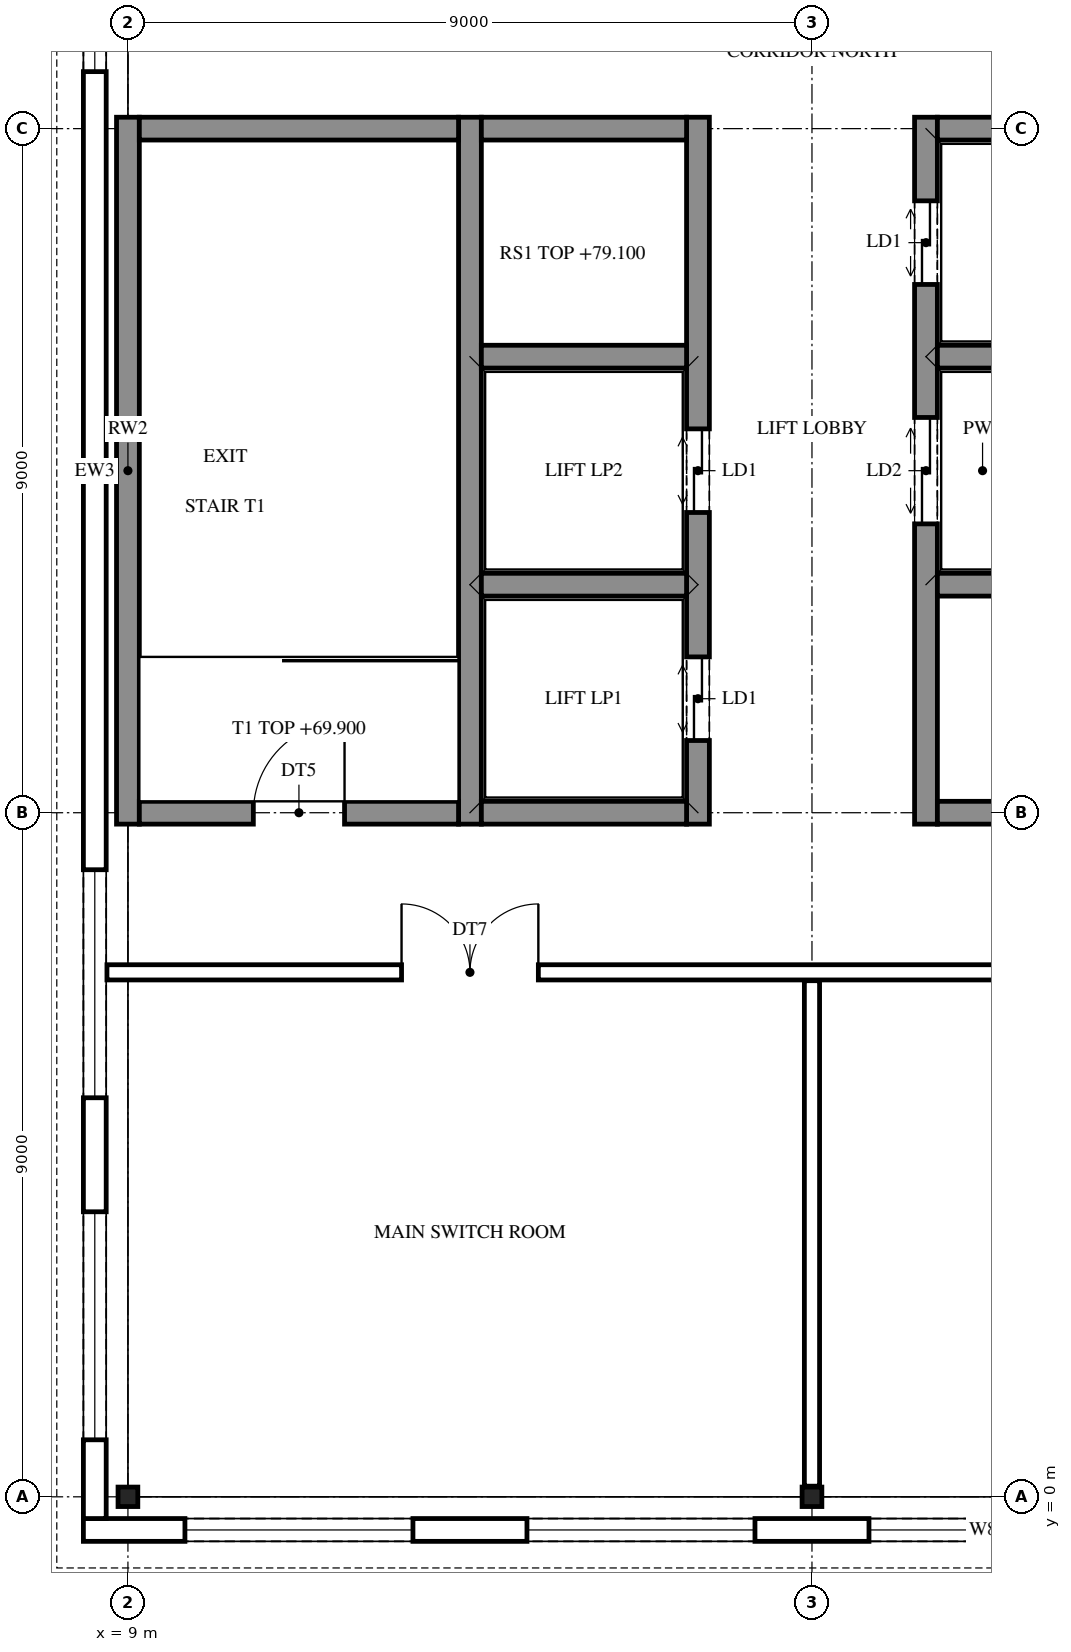
"""IFC4 building model, lengths in metres.
Left out: names, types, materials, properties, quantities, classifications, styles, units other than length and angle.
Written with IfcOpenShell. Run it as: python <this file> out.ifc"""

import sys

from ifc_helpers import new_model, si_unit, direction, frame, frame_2d, origin, origin_2d, place, context, subcontext, project, spatial, rectangle, i_section, extrude, element, fill, save


model = new_model("IFC4")
c1 = context("Model", 3, precision=1e-05, world=origin(), true_north=direction((0.0, 1.0)))
c2 = subcontext(c1, "Body", "Model", "MODEL_VIEW")
j1 = project(units=[si_unit("LENGTHUNIT", "METRE"), si_unit("PLANEANGLEUNIT", "RADIAN")], contexts=[c1])
p1 = place(None, origin())
s1 = spatial("IfcSite", under=j1, at=p1, CompositionType="ELEMENT")
p2 = place(p1, origin())
s2 = spatial("IfcBuilding", under=s1, at=p2, CompositionType="ELEMENT")
p3 = place(p2, frame((0.0, 0.0, 69.9)))
s3 = spatial("IfcBuildingStorey", under=s2, at=p3, CompositionType="ELEMENT", Elevation=69.9)
for number, where, z_axis, x_axis in (
    (1, (9.0, 0.0, 0.0), (0.0, 0.0, 1.0), (0.0, 1.0, 0.0)),
    (2, (18.0, 0.0, 0.0), (0.0, 0.0, 1.0), (0.0, 1.0, 0.0)),
):
    element("IfcColumn", number, at=place(p3, frame(where, z_axis=z_axis, x_axis=x_axis)), inside=s3, PredefinedType="COLUMN", context=c2, shape_type="SweptSolid", body=[
        extrude(i_section(OverallWidth=0.256, OverallDepth=0.26, WebThickness=0.01, FlangeThickness=0.017, FilletRadius=0.014, at=origin_2d()), origin(), (0.0, 0.0, 1.0), 4.5),
    ])
for number, where, z_axis, x_axis in (
    (3, (9.0, 8.85, 0.0), (0.0, 0.0, 1.0), (0.0, 1.0, 0.0)),
    (4, (13.5, 8.85, 0.0), (0.0, 0.0, 1.0), (0.0, 1.0, 0.0)),
):
    element("IfcWall", number, at=place(p3, frame(where, z_axis=z_axis, x_axis=x_axis)), inside=s3, PredefinedType="SHEAR", context=c2, shape_type="SweptSolid", body=[
        extrude(rectangle(XDim=9.3, YDim=0.3, at=frame_2d((4.65, 0.0))), origin(), (0.0, 0.0, 1.0), 4.5),
    ])
p4 = place(p3, frame((16.5, 8.85, 0.0), z_axis=(0.0, 0.0, 1.0), x_axis=(0.0, 1.0, 0.0)))
e5 = element("IfcWall", 5, at=p4, inside=s3, PredefinedType="SHEAR", context=c2, shape_type="SweptSolid", body=[
    extrude(rectangle(XDim=9.3, YDim=0.3, at=frame_2d((4.65, 0.0))), origin(), (0.0, 0.0, 1.0), 4.5),
])
p5 = place(p4, frame((1.1, 0.0, 0.0)))
e6 = element("IfcOpeningElement", 6, at=p5, cuts=e5, PredefinedType="OPENING", context=c2, shape_type="SweptSolid", body=[
    extrude(rectangle(XDim=1.1, YDim=2.1, at=frame_2d((0.55, 1.05))), frame((0.0, 0.16, 0.0), z_axis=(0.0, -1.0, 0.0), x_axis=(1.0, 0.0, 0.0)), (0.0, 0.0, 1.0), 0.32),
])
p6 = place(p4, frame((4.1, 0.0, 0.0)))
e7 = element("IfcOpeningElement", 7, at=p6, cuts=e5, PredefinedType="OPENING", context=c2, shape_type="SweptSolid", body=[
    extrude(rectangle(XDim=1.1, YDim=2.1, at=frame_2d((0.55, 1.05))), frame((0.0, 0.16, 0.0), z_axis=(0.0, -1.0, 0.0), x_axis=(1.0, 0.0, 0.0)), (0.0, 0.0, 1.0), 0.32),
])
p7 = place(p3, frame((19.5, 8.85, 0.0), z_axis=(0.0, 0.0, 1.0), x_axis=(0.0, 1.0, 0.0)))
e8 = element("IfcWall", 8, at=p7, inside=s3, PredefinedType="SHEAR", context=c2, shape_type="SweptSolid", body=[
    extrude(rectangle(XDim=9.3, YDim=0.3, at=frame_2d((4.65, 0.0))), origin(), (0.0, 0.0, 1.0), 4.5),
])
p8 = place(p7, frame((3.95, 0.0, 0.0)))
e9 = element("IfcOpeningElement", 9, at=p8, cuts=e8, PredefinedType="OPENING", context=c2, shape_type="SweptSolid", body=[
    extrude(rectangle(XDim=1.4, YDim=2.1, at=frame_2d((0.7, 1.05))), frame((0.0, 0.16, 0.0), z_axis=(0.0, -1.0, 0.0), x_axis=(1.0, 0.0, 0.0)), (0.0, 0.0, 1.0), 0.32),
])
p9 = place(p7, frame((7.1, 0.0, 0.0)))
e10 = element("IfcOpeningElement", 10, at=p9, cuts=e8, PredefinedType="OPENING", context=c2, shape_type="SweptSolid", body=[
    extrude(rectangle(XDim=1.1, YDim=2.1, at=frame_2d((0.55, 1.05))), frame((0.0, 0.16, 0.0), z_axis=(0.0, -1.0, 0.0), x_axis=(1.0, 0.0, 0.0)), (0.0, 0.0, 1.0), 0.32),
])
p10 = place(p3, frame((9.15, 9.0, 0.0), z_axis=(0.0, 0.0, 1.0), x_axis=(1.0, 0.0, 0.0)))
e11 = element("IfcWall", 11, at=p10, inside=s3, PredefinedType="SHEAR", context=c2, shape_type="SweptSolid", body=[
    extrude(rectangle(XDim=4.2, YDim=0.3, at=frame_2d((2.1, 0.0))), origin(), (0.0, 0.0, 1.0), 4.5),
])
p11 = place(p10, frame((1.5, 0.0, 0.0)))
e12 = element("IfcOpeningElement", 12, at=p11, cuts=e11, PredefinedType="OPENING", context=c2, shape_type="SweptSolid", body=[
    extrude(rectangle(XDim=1.2, YDim=2.1, at=frame_2d((0.6, 1.05))), frame((0.0, 0.16, 0.0), z_axis=(0.0, -1.0, 0.0), x_axis=(1.0, 0.0, 0.0)), (0.0, 0.0, 1.0), 0.32),
])
for number, where, z_axis, x_axis in (
    (13, (13.65, 9.0, 0.0), (0.0, 0.0, 1.0), (1.0, 0.0, 0.0)),
    (14, (19.65, 9.0, 0.0), (0.0, 0.0, 1.0), (1.0, 0.0, 0.0)),
    (15, (13.65, 12.0, 0.0), (0.0, 0.0, 1.0), (1.0, 0.0, 0.0)),
    (16, (19.65, 12.0, 0.0), (0.0, 0.0, 1.0), (1.0, 0.0, 0.0)),
    (17, (13.65, 15.0, 0.0), (0.0, 0.0, 1.0), (1.0, 0.0, 0.0)),
    (18, (19.65, 15.0, 0.0), (0.0, 0.0, 1.0), (1.0, 0.0, 0.0)),
):
    element("IfcWall", number, at=place(p3, frame(where, z_axis=z_axis, x_axis=x_axis)), inside=s3, PredefinedType="SHEAR", context=c2, shape_type="SweptSolid", body=[
        extrude(rectangle(XDim=2.7, YDim=0.3, at=frame_2d((1.35, 0.0))), origin(), (0.0, 0.0, 1.0), 4.5),
    ])
p12 = place(p3, frame((9.15, 18.0, 0.0), z_axis=(0.0, 0.0, 1.0), x_axis=(1.0, 0.0, 0.0)))
e19 = element("IfcWall", 19, at=p12, inside=s3, PredefinedType="SHEAR", context=c2, shape_type="SweptSolid", body=[
    extrude(rectangle(XDim=4.2, YDim=0.3, at=frame_2d((2.1, 0.0))), origin(), (0.0, 0.0, 1.0), 4.5),
])
for number, where, z_axis, x_axis in (
    (20, (13.65, 18.0, 0.0), (0.0, 0.0, 1.0), (1.0, 0.0, 0.0)),
    (21, (19.65, 18.0, 0.0), (0.0, 0.0, 1.0), (1.0, 0.0, 0.0)),
):
    element("IfcWall", number, at=place(p3, frame(where, z_axis=z_axis, x_axis=x_axis)), inside=s3, PredefinedType="SHEAR", context=c2, shape_type="SweptSolid", body=[
        extrude(rectangle(XDim=2.7, YDim=0.3, at=frame_2d((1.35, 0.0))), origin(), (0.0, 0.0, 1.0), 4.5),
    ])
p13 = place(p3, frame((32.075, -0.436, 0.0), z_axis=(0.0, 0.0, 1.0), x_axis=(-1.0, 0.0, 0.0)))
e22 = element("IfcWall", 22, at=p13, inside=s3, PredefinedType="STANDARD", context=c2, shape_type="SweptSolid", body=[
    extrude(rectangle(XDim=23.661, YDim=0.3, at=frame_2d((11.831, 0.0))), origin(), (0.0, 0.0, 1.0), 4.5),
])
p14 = place(p13, frame((19.325, 0.0, 0.6)))
e23 = element("IfcOpeningElement", 23, at=p14, cuts=e22, PredefinedType="OPENING", context=c2, shape_type="SweptSolid", body=[
    extrude(rectangle(XDim=3.0, YDim=3.1, at=frame_2d((1.5, 1.55))), frame((0.0, 0.16, 0.0), z_axis=(0.0, -1.0, 0.0), x_axis=(1.0, 0.0, 0.0)), (0.0, 0.0, 1.0), 0.32),
])
p15 = place(p13, frame((14.825, 0.0, 0.6)))
e24 = element("IfcOpeningElement", 24, at=p15, cuts=e22, PredefinedType="OPENING", context=c2, shape_type="SweptSolid", body=[
    extrude(rectangle(XDim=3.0, YDim=3.1, at=frame_2d((1.5, 1.55))), frame((0.0, 0.16, 0.0), z_axis=(0.0, -1.0, 0.0), x_axis=(1.0, 0.0, 0.0)), (0.0, 0.0, 1.0), 0.32),
])
p16 = place(p13, frame((10.325, 0.0, 0.6)))
e25 = element("IfcOpeningElement", 25, at=p16, cuts=e22, PredefinedType="OPENING", context=c2, shape_type="SweptSolid", body=[
    extrude(rectangle(XDim=3.0, YDim=3.1, at=frame_2d((1.5, 1.55))), frame((0.0, 0.16, 0.0), z_axis=(0.0, -1.0, 0.0), x_axis=(1.0, 0.0, 0.0)), (0.0, 0.0, 1.0), 0.32),
])
p17 = place(p13, frame((5.825, 0.0, 0.6)))
e26 = element("IfcOpeningElement", 26, at=p17, cuts=e22, PredefinedType="OPENING", context=c2, shape_type="SweptSolid", body=[
    extrude(rectangle(XDim=3.0, YDim=3.1, at=frame_2d((1.5, 1.55))), frame((0.0, 0.16, 0.0), z_axis=(0.0, -1.0, 0.0), x_axis=(1.0, 0.0, 0.0)), (0.0, 0.0, 1.0), 0.32),
])
p18 = place(p13, frame((1.325, 0.0, 0.6)))
e27 = element("IfcOpeningElement", 27, at=p18, cuts=e22, PredefinedType="OPENING", context=c2, shape_type="SweptSolid", body=[
    extrude(rectangle(XDim=3.0, YDim=3.1, at=frame_2d((1.5, 1.55))), frame((0.0, 0.16, 0.0), z_axis=(0.0, -1.0, 0.0), x_axis=(1.0, 0.0, 0.0)), (0.0, 0.0, 1.0), 0.32),
])
p19 = place(p3, frame((8.564, -0.286, 0.0), z_axis=(0.0, 0.0, 1.0), x_axis=(0.0, 1.0, 0.0)))
e28 = element("IfcWall", 28, at=p19, inside=s3, PredefinedType="STANDARD", context=c2, shape_type="SweptSolid", body=[
    extrude(rectangle(XDim=27.572, YDim=0.3, at=frame_2d((13.786, 0.0))), origin(), (0.0, 0.0, 1.0), 4.5),
])
p20 = place(p19, frame((1.036, 0.0, 0.6)))
e29 = element("IfcOpeningElement", 29, at=p20, cuts=e28, PredefinedType="OPENING", context=c2, shape_type="SweptSolid", body=[
    extrude(rectangle(XDim=3.0, YDim=3.1, at=frame_2d((1.5, 1.55))), frame((0.0, 0.16, 0.0), z_axis=(0.0, -1.0, 0.0), x_axis=(1.0, 0.0, 0.0)), (0.0, 0.0, 1.0), 0.32),
])
p21 = place(p19, frame((5.536, 0.0, 0.6)))
e30 = element("IfcOpeningElement", 30, at=p21, cuts=e28, PredefinedType="OPENING", context=c2, shape_type="SweptSolid", body=[
    extrude(rectangle(XDim=3.0, YDim=3.1, at=frame_2d((1.5, 1.55))), frame((0.0, 0.16, 0.0), z_axis=(0.0, -1.0, 0.0), x_axis=(1.0, 0.0, 0.0)), (0.0, 0.0, 1.0), 0.32),
])
p22 = place(p19, frame((19.036, 0.0, 0.6)))
e31 = element("IfcOpeningElement", 31, at=p22, cuts=e28, PredefinedType="OPENING", context=c2, shape_type="SweptSolid", body=[
    extrude(rectangle(XDim=3.0, YDim=3.1, at=frame_2d((1.5, 1.55))), frame((0.0, 0.16, 0.0), z_axis=(0.0, -1.0, 0.0), x_axis=(1.0, 0.0, 0.0)), (0.0, 0.0, 1.0), 0.32),
])
p23 = place(p19, frame((23.536, 0.0, 0.6)))
e32 = element("IfcOpeningElement", 32, at=p23, cuts=e28, PredefinedType="OPENING", context=c2, shape_type="SweptSolid", body=[
    extrude(rectangle(XDim=3.0, YDim=3.1, at=frame_2d((1.5, 1.55))), frame((0.0, 0.16, 0.0), z_axis=(0.0, -1.0, 0.0), x_axis=(1.0, 0.0, 0.0)), (0.0, 0.0, 1.0), 0.32),
])
p24 = place(p3, frame((32.075, -0.436, 4.5), z_axis=(0.0, 0.0, 1.0), x_axis=(-1.0, 0.0, 0.0)))
e33 = element("IfcWall", 33, at=p24, inside=s3, PredefinedType="PARAPET", context=c2, shape_type="SweptSolid", body=[
    extrude(rectangle(XDim=23.661, YDim=0.3, at=frame_2d((11.831, 0.0))), origin(), (0.0, 0.0, 1.0), 1.25),
])
p25 = place(p3, frame((8.564, -0.286, 4.5), z_axis=(0.0, 0.0, 1.0), x_axis=(0.0, 1.0, 0.0)))
e34 = element("IfcWall", 34, at=p25, inside=s3, PredefinedType="PARAPET", context=c2, shape_type="SweptSolid", body=[
    extrude(rectangle(XDim=27.572, YDim=0.3, at=frame_2d((13.786, 0.0))), origin(), (0.0, 0.0, 1.0), 1.25),
])
p26 = place(p3, frame((18.0, 0.14, 0.0), z_axis=(0.0, 0.0, 1.0), x_axis=(0.0, 1.0, 0.0)))
e35 = element("IfcWall", 35, at=p26, inside=s3, PredefinedType="PARTITIONING", context=c2, shape_type="SweptSolid", body=[
    extrude(rectangle(XDim=6.65, YDim=0.2, at=frame_2d((3.325, 0.0))), origin(), (0.0, 0.0, 1.0), 3.822),
])
p27 = place(p3, frame((8.724, 6.9, 0.0), z_axis=(0.0, 0.0, 1.0), x_axis=(1.0, 0.0, 0.0)))
e36 = element("IfcWall", 36, at=p27, inside=s3, PredefinedType="PARTITIONING", context=c2, shape_type="SweptSolid", body=[
    extrude(rectangle(XDim=18.276, YDim=0.2, at=frame_2d((9.138, 0.0))), origin(), (0.0, 0.0, 1.0), 3.822),
])
p28 = place(p27, frame((3.876, 0.0, 0.0)))
e37 = element("IfcOpeningElement", 37, at=p28, cuts=e36, PredefinedType="OPENING", context=c2, shape_type="SweptSolid", body=[
    extrude(rectangle(XDim=1.8, YDim=2.1, at=frame_2d((0.9, 1.05))), frame((0.0, 0.11, 0.0), z_axis=(0.0, -1.0, 0.0), x_axis=(1.0, 0.0, 0.0)), (0.0, 0.0, 1.0), 0.22),
])
p29 = place(p27, frame((14.076, 0.0, 0.0)))
e38 = element("IfcOpeningElement", 38, at=p29, cuts=e36, PredefinedType="OPENING", context=c2, shape_type="SweptSolid", body=[
    extrude(rectangle(XDim=1.8, YDim=2.1, at=frame_2d((0.9, 1.05))), frame((0.0, 0.11, 0.0), z_axis=(0.0, -1.0, 0.0), x_axis=(1.0, 0.0, 0.0)), (0.0, 0.0, 1.0), 0.22),
])
for number, where, z_axis, x_axis in (
    (39, (13.5, 8.85, 4.5), (0.0, 0.0, 1.0), (0.0, 1.0, 0.0)),
    (40, (16.5, 8.85, 4.5), (0.0, 0.0, 1.0), (0.0, 1.0, 0.0)),
):
    element("IfcWall", number, at=place(p3, frame(where, z_axis=z_axis, x_axis=x_axis)), inside=s3, PredefinedType="SOLIDWALL", context=c2, shape_type="SweptSolid", body=[
        extrude(rectangle(XDim=9.3, YDim=0.3, at=frame_2d((4.65, 0.0))), origin(), (0.0, 0.0, 1.0), 4.5),
    ])
for number, where, z_axis, x_axis in (
    (41, (13.65, 9.0, 4.5), (0.0, 0.0, 1.0), (1.0, 0.0, 0.0)),
    (42, (13.65, 12.0, 4.5), (0.0, 0.0, 1.0), (1.0, 0.0, 0.0)),
    (43, (13.65, 15.0, 4.5), (0.0, 0.0, 1.0), (1.0, 0.0, 0.0)),
    (44, (13.65, 18.0, 4.5), (0.0, 0.0, 1.0), (1.0, 0.0, 0.0)),
):
    element("IfcWall", number, at=place(p3, frame(where, z_axis=z_axis, x_axis=x_axis)), inside=s3, PredefinedType="SOLIDWALL", context=c2, shape_type="SweptSolid", body=[
        extrude(rectangle(XDim=2.7, YDim=0.3, at=frame_2d((1.35, 0.0))), origin(), (0.0, 0.0, 1.0), 4.5),
    ])
p30 = place(p3, frame((19.5, 8.85, 4.5), z_axis=(0.0, 0.0, 1.0), x_axis=(0.0, 1.0, 0.0)))
e45 = element("IfcWall", 45, at=p30, inside=s3, PredefinedType="SOLIDWALL", context=c2, shape_type="SweptSolid", body=[
    extrude(rectangle(XDim=9.3, YDim=0.3, at=frame_2d((4.65, 0.0))), origin(), (0.0, 0.0, 1.0), 4.5),
])
for number, where, z_axis, x_axis in (
    (46, (19.65, 9.0, 4.5), (0.0, 0.0, 1.0), (1.0, 0.0, 0.0)),
    (47, (19.65, 12.0, 4.5), (0.0, 0.0, 1.0), (1.0, 0.0, 0.0)),
    (48, (19.65, 15.0, 4.5), (0.0, 0.0, 1.0), (1.0, 0.0, 0.0)),
    (49, (19.65, 18.0, 4.5), (0.0, 0.0, 1.0), (1.0, 0.0, 0.0)),
):
    element("IfcWall", number, at=place(p3, frame(where, z_axis=z_axis, x_axis=x_axis)), inside=s3, PredefinedType="SOLIDWALL", context=c2, shape_type="SweptSolid", body=[
        extrude(rectangle(XDim=2.7, YDim=0.3, at=frame_2d((1.35, 0.0))), origin(), (0.0, 0.0, 1.0), 4.5),
    ])
p31 = place(p14, origin())
e50 = element("IfcWindow", 50, at=p31, inside=s3, PartitioningType="SINGLE_PANEL", PredefinedType="WINDOW", context=c2, shape_type="SweptSolid", body=[
    extrude(rectangle(XDim=3.0, YDim=3.1, at=frame_2d((1.5, 1.55))), frame((0.0, 0.03, 0.0), z_axis=(0.0, -1.0, 0.0), x_axis=(1.0, 0.0, 0.0)), (0.0, 0.0, 1.0), 0.06),
])
fill(e23, e50)
p32 = place(p15, origin())
e51 = element("IfcWindow", 51, at=p32, inside=s3, PartitioningType="SINGLE_PANEL", PredefinedType="WINDOW", context=c2, shape_type="SweptSolid", body=[
    extrude(rectangle(XDim=3.0, YDim=3.1, at=frame_2d((1.5, 1.55))), frame((0.0, 0.03, 0.0), z_axis=(0.0, -1.0, 0.0), x_axis=(1.0, 0.0, 0.0)), (0.0, 0.0, 1.0), 0.06),
])
fill(e24, e51)
p33 = place(p16, origin())
e52 = element("IfcWindow", 52, at=p33, inside=s3, PartitioningType="SINGLE_PANEL", PredefinedType="WINDOW", context=c2, shape_type="SweptSolid", body=[
    extrude(rectangle(XDim=3.0, YDim=3.1, at=frame_2d((1.5, 1.55))), frame((0.0, 0.03, 0.0), z_axis=(0.0, -1.0, 0.0), x_axis=(1.0, 0.0, 0.0)), (0.0, 0.0, 1.0), 0.06),
])
fill(e25, e52)
p34 = place(p20, origin())
e53 = element("IfcWindow", 53, at=p34, inside=s3, PartitioningType="SINGLE_PANEL", PredefinedType="WINDOW", context=c2, shape_type="SweptSolid", body=[
    extrude(rectangle(XDim=3.0, YDim=3.1, at=frame_2d((1.5, 1.55))), frame((0.0, 0.03, 0.0), z_axis=(0.0, -1.0, 0.0), x_axis=(1.0, 0.0, 0.0)), (0.0, 0.0, 1.0), 0.06),
])
fill(e29, e53)
p35 = place(p21, origin())
e54 = element("IfcWindow", 54, at=p35, inside=s3, PartitioningType="SINGLE_PANEL", PredefinedType="WINDOW", context=c2, shape_type="SweptSolid", body=[
    extrude(rectangle(XDim=3.0, YDim=3.1, at=frame_2d((1.5, 1.55))), frame((0.0, 0.03, 0.0), z_axis=(0.0, -1.0, 0.0), x_axis=(1.0, 0.0, 0.0)), (0.0, 0.0, 1.0), 0.06),
])
fill(e30, e54)
p36 = place(p22, origin())
e55 = element("IfcWindow", 55, at=p36, inside=s3, PartitioningType="SINGLE_PANEL", PredefinedType="WINDOW", context=c2, shape_type="SweptSolid", body=[
    extrude(rectangle(XDim=3.0, YDim=3.1, at=frame_2d((1.5, 1.55))), frame((0.0, 0.03, 0.0), z_axis=(0.0, -1.0, 0.0), x_axis=(1.0, 0.0, 0.0)), (0.0, 0.0, 1.0), 0.06),
])
fill(e31, e55)
p37 = place(p11, origin())
e56 = element("IfcDoor", 56, at=p37, inside=s3, OperationType="SINGLE_SWING_RIGHT", PredefinedType="DOOR", context=c2, shape_type="SweptSolid", body=[
    extrude(rectangle(XDim=1.2, YDim=2.1, at=frame_2d((0.6, 1.05))), frame((0.0, 0.025, 0.0), z_axis=(0.0, -1.0, 0.0), x_axis=(1.0, 0.0, 0.0)), (0.0, 0.0, 1.0), 0.05),
])
fill(e12, e56)
p38 = place(p28, frame((1.8, 0.0, 0.0), z_axis=(0.0, 0.0, 1.0), x_axis=(-1.0, 0.0, 0.0)))
e57 = element("IfcDoor", 57, at=p38, inside=s3, OperationType="DOUBLE_DOOR_SINGLE_SWING", PredefinedType="DOOR", context=c2, shape_type="SweptSolid", body=[
    extrude(rectangle(XDim=1.8, YDim=2.1, at=frame_2d((0.9, 1.05))), frame((0.0, 0.025, 0.0), z_axis=(0.0, -1.0, 0.0), x_axis=(1.0, 0.0, 0.0)), (0.0, 0.0, 1.0), 0.05),
])
fill(e37, e57)
p39 = place(p5, origin())
e58 = element("IfcDoor", 58, at=p39, inside=s3, OperationType="DOUBLE_DOOR_SLIDING", PredefinedType="DOOR", context=c2, shape_type="SweptSolid", body=[
    extrude(rectangle(XDim=1.1, YDim=2.1, at=frame_2d((0.55, 1.05))), frame((0.0, 0.025, 0.0), z_axis=(0.0, -1.0, 0.0), x_axis=(1.0, 0.0, 0.0)), (0.0, 0.0, 1.0), 0.05),
])
fill(e6, e58)
p40 = place(p6, origin())
e59 = element("IfcDoor", 59, at=p40, inside=s3, OperationType="DOUBLE_DOOR_SLIDING", PredefinedType="DOOR", context=c2, shape_type="SweptSolid", body=[
    extrude(rectangle(XDim=1.1, YDim=2.1, at=frame_2d((0.55, 1.05))), frame((0.0, 0.025, 0.0), z_axis=(0.0, -1.0, 0.0), x_axis=(1.0, 0.0, 0.0)), (0.0, 0.0, 1.0), 0.05),
])
fill(e7, e59)
p41 = place(p8, origin())
e60 = element("IfcDoor", 60, at=p41, inside=s3, OperationType="DOUBLE_DOOR_SLIDING", PredefinedType="DOOR", context=c2, shape_type="SweptSolid", body=[
    extrude(rectangle(XDim=1.4, YDim=2.1, at=frame_2d((0.7, 1.05))), frame((0.0, 0.025, 0.0), z_axis=(0.0, -1.0, 0.0), x_axis=(1.0, 0.0, 0.0)), (0.0, 0.0, 1.0), 0.05),
])
fill(e9, e60)
p42 = place(p9, origin())
e61 = element("IfcDoor", 61, at=p42, inside=s3, OperationType="DOUBLE_DOOR_SLIDING", PredefinedType="DOOR", context=c2, shape_type="SweptSolid", body=[
    extrude(rectangle(XDim=1.1, YDim=2.1, at=frame_2d((0.55, 1.05))), frame((0.0, 0.025, 0.0), z_axis=(0.0, -1.0, 0.0), x_axis=(1.0, 0.0, 0.0)), (0.0, 0.0, 1.0), 0.05),
])
fill(e10, e61)
save(model, sys.argv[1])
